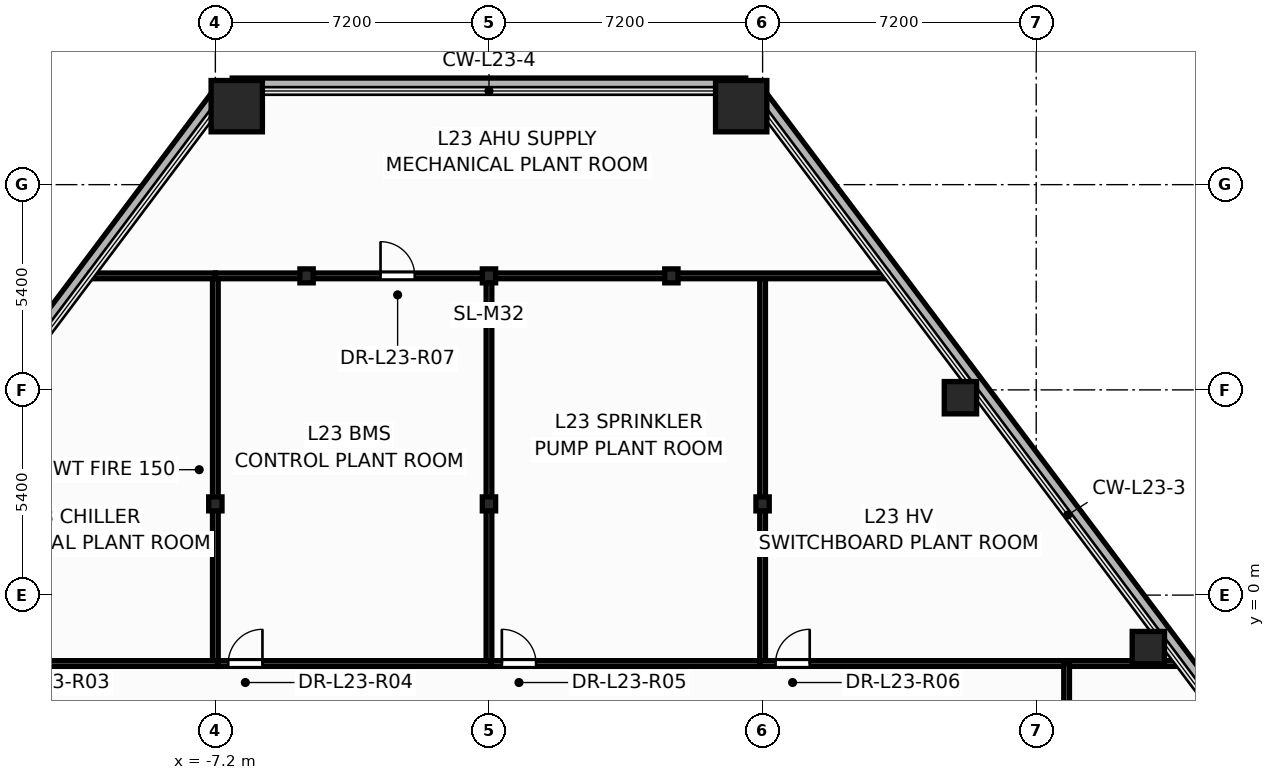
"""IFC4 building model, lengths in metres.
Left out: names, types, materials, properties, quantities, classifications, styles, units other than length and angle.
Written with IfcOpenShell. Run it as: python <this file> out.ifc"""

import sys

from ifc_helpers import new_model, si_unit, direction, frame, frame_2d, origin, origin_2d, place, context, subcontext, project, spatial, rectangle, hollow_rectangle, hollow_circle, i_section, extrude, element, fill, save


model = new_model("IFC4")
c1 = context("Model", 3, precision=1e-05, world=origin(), true_north=direction((0.0, 1.0)))
c2 = subcontext(c1, "Body", "Model", "MODEL_VIEW")
j1 = project(units=[si_unit("LENGTHUNIT", "METRE"), si_unit("PLANEANGLEUNIT", "RADIAN")], contexts=[c1])
p1 = place(None, origin())
s1 = spatial("IfcSite", under=j1, at=p1, CompositionType="ELEMENT")
p2 = place(p1, origin())
s2 = spatial("IfcBuilding", under=s1, at=p2, CompositionType="ELEMENT")
p3 = place(p2, frame((0.0, 0.0, 90.0)))
s3 = spatial("IfcBuildingStorey", under=s2, at=p3, CompositionType="ELEMENT", Elevation=90.0)
for number, where, z_axis, x_axis in (
    (1, (6.637, 12.865, 0.0), (0.0, 0.0, 1.0), (1.0, 0.0, 0.0)),
    (2, (-6.637, 12.865, 0.0), (0.0, 0.0, 1.0), (1.0, 0.0, 0.0)),
):
    element("IfcColumn", number, at=place(p3, frame(where, z_axis=z_axis, x_axis=x_axis)), inside=s3, PredefinedType="COLUMN", context=c2, shape_type="SweptSolid", body=[
        extrude(hollow_rectangle(XDim=1.35, YDim=1.35, WallThickness=0.065, at=origin_2d()), origin(), (0.0, 0.0, 1.0), 4.8),
    ])
for number, where, z_axis, x_axis in (
    (3, (17.351, -1.381, 0.0), (0.0, 0.0, 1.0), (1.0, 0.0, 0.0)),
    (4, (12.406, 5.194, 0.0), (0.0, 0.0, 1.0), (1.0, 0.0, 0.0)),
):
    element("IfcColumn", number, at=place(p3, frame(where, z_axis=z_axis, x_axis=x_axis)), inside=s3, PredefinedType="COLUMN", context=c2, shape_type="SweptSolid", body=[
        extrude(hollow_circle(Radius=0.425, WallThickness=0.038, at=origin_2d()), origin(), (0.0, 0.0, 1.0), 4.8),
    ])
for number, where, z_axis, x_axis in (
    (5, (-7.2, 2.4, 0.0), (0.0, 0.0, 1.0), (1.0, 0.0, 0.0)),
    (6, (0.0, 2.4, 0.0), (0.0, 0.0, 1.0), (1.0, 0.0, 0.0)),
    (7, (7.2, 2.4, 0.0), (0.0, 0.0, 1.0), (1.0, 0.0, 0.0)),
    (8, (-4.8, 8.4, 0.0), (0.0, 0.0, 1.0), (1.0, 0.0, 0.0)),
    (9, (0.0, 8.4, 0.0), (0.0, 0.0, 1.0), (1.0, 0.0, 0.0)),
    (10, (4.8, 8.4, 0.0), (0.0, 0.0, 1.0), (1.0, 0.0, 0.0)),
):
    element("IfcColumn", number, at=place(p3, frame(where, z_axis=z_axis, x_axis=x_axis)), inside=s3, PredefinedType="COLUMN", context=c2, shape_type="SweptSolid", body=[
        extrude(i_section(OverallWidth=0.35, OverallDepth=0.367, WebThickness=0.025, FlangeThickness=0.032, at=origin_2d()), origin(), (0.0, 0.0, 1.0), 4.8),
    ])
p4 = place(p3, frame((23.7, -8.892, -0.2), z_axis=(0.0, 0.0, 1.0), x_axis=(-0.601043466881, 0.799216335493, 0.0)))
e11 = element("IfcWall", 11, at=p4, inside=s3, PredefinedType="PARAPET", context=c2, shape_type="SweptSolid", body=[
    extrude(rectangle(XDim=27.763, YDim=0.36, at=frame_2d((13.882, 0.0))), origin(), (0.0, 0.0, 1.0), 0.38),
])
p5 = place(p3, frame((6.757, 13.425, -0.2), z_axis=(0.0, 0.0, 1.0), x_axis=(-1.0, 0.0, 0.0)))
e12 = element("IfcWall", 12, at=p5, inside=s3, PredefinedType="PARAPET", context=c2, shape_type="SweptSolid", body=[
    extrude(rectangle(XDim=13.513, YDim=0.36, at=frame_2d((6.757, 0.0))), origin(), (0.0, 0.0, 1.0), 0.38),
])
p6 = place(p3, frame((-7.013, 13.297, -0.2), z_axis=(0.0, 0.0, 1.0), x_axis=(-0.601043466881, -0.799216335493, 0.0)))
e13 = element("IfcWall", 13, at=p6, inside=s3, PredefinedType="PARAPET", context=c2, shape_type="SweptSolid", body=[
    extrude(rectangle(XDim=27.763, YDim=0.36, at=frame_2d((13.882, 0.0))), origin(), (0.0, 0.0, 1.0), 0.38),
])
p7 = place(p3, frame((-7.2, -1.8, 0.0), z_axis=(0.0, 0.0, 1.0), x_axis=(0.0, 1.0, 0.0)))
e14 = element("IfcWall", 14, at=p7, inside=s3, PredefinedType="PARTITIONING", context=c2, shape_type="SweptSolid", body=[
    extrude(rectangle(XDim=10.2, YDim=0.15, at=frame_2d((5.1, 0.0))), origin(), (0.0, 0.0, 1.0), 2.485),
])
p8 = place(p3, frame((0.0, -1.8, 0.0), z_axis=(0.0, 0.0, 1.0), x_axis=(0.0, 1.0, 0.0)))
e15 = element("IfcWall", 15, at=p8, inside=s3, PredefinedType="PARTITIONING", context=c2, shape_type="SweptSolid", body=[
    extrude(rectangle(XDim=10.2, YDim=0.15, at=frame_2d((5.1, 0.0))), origin(), (0.0, 0.0, 1.0), 3.495),
])
p9 = place(p3, frame((7.2, -1.8, 0.0), z_axis=(0.0, 0.0, 1.0), x_axis=(0.0, 1.0, 0.0)))
e16 = element("IfcWall", 16, at=p9, inside=s3, PredefinedType="PARTITIONING", context=c2, shape_type="SweptSolid", body=[
    extrude(rectangle(XDim=10.2, YDim=0.15, at=frame_2d((5.1, 0.0))), origin(), (0.0, 0.0, 1.0), 2.485),
])
p10 = place(p3, frame((-15.2, -1.8, 0.0), z_axis=(0.0, 0.0, 1.0), x_axis=(1.0, 0.0, 0.0)))
e17 = element("IfcWall", 17, at=p10, inside=s3, PredefinedType="PARTITIONING", context=c2, shape_type="SweptSolid", body=[
    extrude(rectangle(XDim=8.06, YDim=0.15, at=frame_2d((4.03, 0.0))), origin(), (0.0, 0.0, 1.0), 2.485),
])
p11 = place(p10, frame((0.36, 0.0, 0.0)))
e18 = element("IfcOpeningElement", 18, at=p11, cuts=e17, PredefinedType="OPENING", context=c2, shape_type="SweptSolid", body=[
    extrude(rectangle(XDim=0.906, YDim=2.104, at=frame_2d((0.45, 1.052))), frame((0.0, 0.085, 0.0), z_axis=(0.0, -1.0, 0.0), x_axis=(1.0, 0.0, 0.0)), (0.0, 0.0, 1.0), 0.17),
])
p12 = place(p3, frame((7.14, -1.8, 0.0), z_axis=(0.0, 0.0, 1.0), x_axis=(1.0, 0.0, 0.0)))
e19 = element("IfcWall", 19, at=p12, inside=s3, PredefinedType="PARTITIONING", context=c2, shape_type="SweptSolid", body=[
    extrude(rectangle(XDim=8.06, YDim=0.15, at=frame_2d((4.03, 0.0))), origin(), (0.0, 0.0, 1.0), 2.485),
])
p13 = place(p12, frame((0.4, 0.0, 0.0)))
e20 = element("IfcOpeningElement", 20, at=p13, cuts=e19, PredefinedType="OPENING", context=c2, shape_type="SweptSolid", body=[
    extrude(rectangle(XDim=0.906, YDim=2.104, at=frame_2d((0.45, 1.052))), frame((0.0, 0.085, 0.0), z_axis=(0.0, -1.0, 0.0), x_axis=(1.0, 0.0, 0.0)), (0.0, 0.0, 1.0), 0.17),
])
p14 = place(p3, frame((-7.138, -1.8, 0.0), z_axis=(0.0, 0.0, 1.0), x_axis=(1.0, 0.0, 0.0)))
e21 = element("IfcWall", 21, at=p14, inside=s3, PredefinedType="PARTITIONING", context=c2, shape_type="SweptSolid", body=[
    extrude(rectangle(XDim=7.198, YDim=0.15, at=frame_2d((3.599, 0.0))), origin(), (0.0, 0.0, 1.0), 2.485),
])
p15 = place(p14, frame((0.277, 0.0, 0.0)))
e22 = element("IfcOpeningElement", 22, at=p15, cuts=e21, PredefinedType="OPENING", context=c2, shape_type="SweptSolid", body=[
    extrude(rectangle(XDim=0.906, YDim=2.104, at=frame_2d((0.45, 1.052))), frame((0.0, 0.085, 0.0), z_axis=(0.0, -1.0, 0.0), x_axis=(1.0, 0.0, 0.0)), (0.0, 0.0, 1.0), 0.17),
])
p16 = place(p3, frame((0.062, -1.8, 0.0), z_axis=(0.0, 0.0, 1.0), x_axis=(1.0, 0.0, 0.0)))
e23 = element("IfcWall", 23, at=p16, inside=s3, PredefinedType="PARTITIONING", context=c2, shape_type="SweptSolid", body=[
    extrude(rectangle(XDim=7.076, YDim=0.15, at=frame_2d((3.538, 0.0))), origin(), (0.0, 0.0, 1.0), 2.485),
])
p17 = place(p16, frame((0.277, 0.0, 0.0)))
e24 = element("IfcOpeningElement", 24, at=p17, cuts=e23, PredefinedType="OPENING", context=c2, shape_type="SweptSolid", body=[
    extrude(rectangle(XDim=0.906, YDim=2.104, at=frame_2d((0.45, 1.052))), frame((0.0, 0.085, 0.0), z_axis=(0.0, -1.0, 0.0), x_axis=(1.0, 0.0, 0.0)), (0.0, 0.0, 1.0), 0.17),
])
p18 = place(p3, frame((-7.2, 8.4, 0.0), z_axis=(0.0, 0.0, 1.0), x_axis=(1.0, 0.0, 0.0)))
e25 = element("IfcWall", 25, at=p18, inside=s3, PredefinedType="PARTITIONING", context=c2, shape_type="SweptSolid", body=[
    extrude(rectangle(XDim=7.2, YDim=0.15, at=frame_2d((3.6, 0.0))), origin(), (0.0, 0.0, 1.0), 2.485),
])
p19 = place(p18, frame((4.346, 0.0, 0.0)))
e26 = element("IfcOpeningElement", 26, at=p19, cuts=e25, PredefinedType="OPENING", context=c2, shape_type="SweptSolid", body=[
    extrude(rectangle(XDim=0.906, YDim=2.104, at=frame_2d((0.45, 1.052))), frame((0.0, 0.085, 0.0), z_axis=(0.0, -1.0, 0.0), x_axis=(1.0, 0.0, 0.0)), (0.0, 0.0, 1.0), 0.17),
])
p20 = place(p3, frame((0.0, 8.4, 0.0), z_axis=(0.0, 0.0, 1.0), x_axis=(1.0, 0.0, 0.0)))
e27 = element("IfcWall", 27, at=p20, inside=s3, PredefinedType="PARTITIONING", context=c2, shape_type="SweptSolid", body=[
    extrude(rectangle(XDim=10.496, YDim=0.15, at=frame_2d((5.248, 0.0))), origin(), (0.0, 0.0, 1.0), 2.485),
])
p21 = place(p3, frame((-10.496, 8.4, 0.0), z_axis=(0.0, 0.0, 1.0), x_axis=(1.0, 0.0, 0.0)))
e28 = element("IfcWall", 28, at=p21, inside=s3, PredefinedType="PARTITIONING", context=c2, shape_type="SweptSolid", body=[
    extrude(rectangle(XDim=3.296, YDim=0.15, at=frame_2d((1.648, 0.0))), origin(), (0.0, 0.0, 1.0), 2.585),
])
p22 = place(p3, frame((15.2, -1.8, 0.0), z_axis=(0.0, 0.0, 1.0), x_axis=(1.0, 0.0, 0.0)))
e29 = element("IfcWall", 29, at=p22, inside=s3, PredefinedType="PARTITIONING", context=c2, shape_type="SweptSolid", body=[
    extrude(rectangle(XDim=2.967, YDim=0.15, at=frame_2d((1.483, 0.0))), origin(), (0.0, 0.0, 1.0), 2.585),
])
p23 = place(p3, frame((15.2, -4.4, 0.0), z_axis=(0.0, 0.0, 1.0), x_axis=(0.0, 1.0, 0.0)))
e30 = element("IfcWall", 30, at=p23, inside=s3, PredefinedType="PARTITIONING", context=c2, shape_type="SweptSolid", body=[
    extrude(rectangle(XDim=2.6, YDim=0.15, at=frame_2d((1.3, 0.0))), origin(), (0.0, 0.0, 1.0), 2.485),
])
p24 = place(p23, frame((0.357, 0.0, 0.0)))
e31 = element("IfcOpeningElement", 31, at=p24, cuts=e30, PredefinedType="OPENING", context=c2, shape_type="SweptSolid", body=[
    extrude(rectangle(XDim=0.906, YDim=2.104, at=frame_2d((0.45, 1.052))), frame((0.0, 0.085, 0.0), z_axis=(0.0, -1.0, 0.0), x_axis=(1.0, 0.0, 0.0)), (0.0, 0.0, 1.0), 0.17),
])
p25 = place(p15, origin())
e32 = element("IfcDoor", 32, at=p25, inside=s3, OperationType="SINGLE_SWING_RIGHT", PredefinedType="DOOR", context=c2, shape_type="SweptSolid", body=[
    extrude(rectangle(XDim=0.9, YDim=2.1, at=frame_2d((0.45, 1.05))), frame((0.0, 0.025, 0.0), z_axis=(0.0, -1.0, 0.0), x_axis=(1.0, 0.0, 0.0)), (0.0, 0.0, 1.0), 0.05),
])
fill(e22, e32)
p26 = place(p17, origin())
e33 = element("IfcDoor", 33, at=p26, inside=s3, OperationType="SINGLE_SWING_LEFT", PredefinedType="DOOR", context=c2, shape_type="SweptSolid", body=[
    extrude(rectangle(XDim=0.9, YDim=2.1, at=frame_2d((0.45, 1.05))), frame((0.0, 0.025, 0.0), z_axis=(0.0, -1.0, 0.0), x_axis=(1.0, 0.0, 0.0)), (0.0, 0.0, 1.0), 0.05),
])
fill(e24, e33)
p27 = place(p13, origin())
e34 = element("IfcDoor", 34, at=p27, inside=s3, OperationType="SINGLE_SWING_RIGHT", PredefinedType="DOOR", context=c2, shape_type="SweptSolid", body=[
    extrude(rectangle(XDim=0.9, YDim=2.1, at=frame_2d((0.45, 1.05))), frame((0.0, 0.025, 0.0), z_axis=(0.0, -1.0, 0.0), x_axis=(1.0, 0.0, 0.0)), (0.0, 0.0, 1.0), 0.05),
])
fill(e20, e34)
p28 = place(p19, origin())
e35 = element("IfcDoor", 35, at=p28, inside=s3, OperationType="SINGLE_SWING_LEFT", PredefinedType="DOOR", context=c2, shape_type="SweptSolid", body=[
    extrude(rectangle(XDim=0.9, YDim=2.1, at=frame_2d((0.45, 1.05))), frame((0.0, 0.025, 0.0), z_axis=(0.0, -1.0, 0.0), x_axis=(1.0, 0.0, 0.0)), (0.0, 0.0, 1.0), 0.05),
])
fill(e26, e35)
save(model, sys.argv[1])
